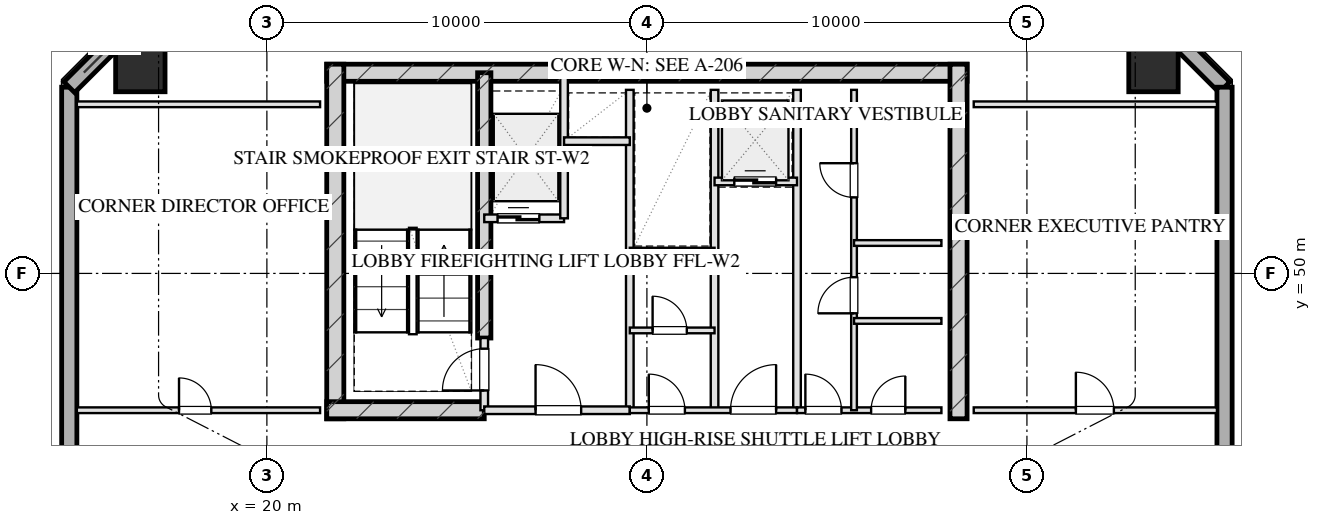
"""IFC4 building model, lengths in metres.
Left out: names, types, materials, properties, quantities, classifications, styles, units other than length and angle.
Written with IfcOpenShell. Run it as: python <this file> out.ifc"""

import sys

from ifc_helpers import new_model, si_unit, direction, frame, frame_2d, origin, origin_2d, place, context, subcontext, project, spatial, rectangle, hollow_rectangle, extrude, element, fill, save


model = new_model("IFC4")
c1 = context("Model", 3, precision=1e-05, world=origin(), true_north=direction((0.0, 1.0)))
c2 = subcontext(c1, "Body", "Model", "MODEL_VIEW")
j1 = project(units=[si_unit("LENGTHUNIT", "METRE"), si_unit("PLANEANGLEUNIT", "RADIAN")], contexts=[c1])
p1 = place(None, origin())
s1 = spatial("IfcSite", under=j1, at=p1, CompositionType="ELEMENT")
p2 = place(p1, origin())
s2 = spatial("IfcBuilding", under=s1, at=p2, CompositionType="ELEMENT")
p3 = place(p2, frame((0.0, 0.0, 223.1)))
s3 = spatial("IfcBuildingStorey", under=s2, at=p3, CompositionType="ELEMENT", Elevation=223.1)
p4 = place(p3, frame((21.575, 55.28, 0.0), z_axis=(0.0, 0.0, 1.0), x_axis=(1.0, 0.0, 0.0)))
e1 = element("IfcWall", 1, at=p4, inside=s3, PredefinedType="SHEAR", context=c2, shape_type="SweptSolid", body=[
    extrude(rectangle(XDim=16.85, YDim=0.45, at=frame_2d((8.425, 0.0))), origin(), (0.0, 0.0, 1.0), 3.45),
])
for number, where, z_axis, x_axis in (
    (2, (21.8, 46.175, 0.0), (0.0, 0.0, 1.0), (0.0, 1.0, 0.0)),
    (3, (38.2, 46.175, 0.0), (0.0, 0.0, 1.0), (0.0, 1.0, 0.0)),
):
    element("IfcWall", number, at=place(p3, frame(where, z_axis=z_axis, x_axis=x_axis)), inside=s3, PredefinedType="SHEAR", context=c2, shape_type="SweptSolid", body=[
        extrude(rectangle(XDim=9.33, YDim=0.45, at=frame_2d((4.665, 0.0))), origin(), (0.0, 0.0, 1.0), 3.45),
    ])
p5 = place(p3, frame((25.72, 48.3, 0.0), z_axis=(0.0, 0.0, 1.0), x_axis=(0.0, 1.0, 0.0)))
e4 = element("IfcWall", 4, at=p5, inside=s3, PredefinedType="SHEAR", context=c2, shape_type="SweptSolid", body=[
    extrude(rectangle(XDim=6.98, YDim=0.35, at=frame_2d((3.49, 0.0))), origin(), (0.0, 0.0, 1.0), 3.45),
])
p6 = place(p3, frame((21.575, 46.4, 0.0), z_axis=(0.0, 0.0, 1.0), x_axis=(1.0, 0.0, 0.0)))
e5 = element("IfcWall", 5, at=p6, inside=s3, PredefinedType="SHEAR", context=c2, shape_type="SweptSolid", body=[
    extrude(rectangle(XDim=4.145, YDim=0.45, at=frame_2d((2.073, 0.0))), origin(), (0.0, 0.0, 1.0), 3.45),
])
for number, where, z_axis, x_axis in (
    (6, (43.33, 55.43, 0.0), (0.0, 0.0, 1.0), (1.0, 0.0, 0.0)),
    (7, (16.67, 55.43, 0.0), (0.0, 0.0, 1.0), (1.0, 0.0, 0.0)),
):
    element("IfcColumn", number, at=place(p3, frame(where, z_axis=z_axis, x_axis=x_axis)), inside=s3, PredefinedType="COLUMN", context=c2, shape_type="SweptSolid", body=[
        extrude(hollow_rectangle(XDim=1.3, YDim=1.3, WallThickness=0.045, at=origin_2d()), origin(), (0.0, 0.0, 1.0), 3.451),
    ])
p7 = place(p3, frame((14.8, 13.1, 0.0), z_axis=(0.0, 0.0, 1.0), x_axis=(0.0, 1.0, 0.0)))
e8 = element("IfcWall", 8, at=p7, inside=s3, PredefinedType="SOLIDWALL", context=c2, shape_type="SweptSolid", body=[
    extrude(rectangle(XDim=41.8, YDim=0.4, at=frame_2d((20.9, 0.0))), origin(), (0.0, 0.0, 1.0), 2.61),
])
p8 = place(p7, frame((13.45, 0.0, 0.75)))
e9 = element("IfcOpeningElement", 9, at=p8, cuts=e8, PredefinedType="OPENING", context=c2, shape_type="SweptSolid", body=[
    extrude(rectangle(XDim=2.1, YDim=1.46, at=frame_2d((1.05, 0.73))), frame((0.0, 0.21, 0.0), z_axis=(0.0, -1.0, 0.0), x_axis=(1.0, 0.0, 0.0)), (0.0, 0.0, 1.0), 0.42),
])
p9 = place(p7, frame((17.25, 0.0, 0.75)))
e10 = element("IfcOpeningElement", 10, at=p9, cuts=e8, PredefinedType="OPENING", context=c2, shape_type="SweptSolid", body=[
    extrude(rectangle(XDim=2.1, YDim=1.46, at=frame_2d((1.05, 0.73))), frame((0.0, 0.21, 0.0), z_axis=(0.0, -1.0, 0.0), x_axis=(1.0, 0.0, 0.0)), (0.0, 0.0, 1.0), 0.42),
])
p10 = place(p7, frame((22.45, 0.0, 0.75)))
e11 = element("IfcOpeningElement", 11, at=p10, cuts=e8, PredefinedType="OPENING", context=c2, shape_type="SweptSolid", body=[
    extrude(rectangle(XDim=2.1, YDim=1.46, at=frame_2d((1.05, 0.73))), frame((0.0, 0.21, 0.0), z_axis=(0.0, -1.0, 0.0), x_axis=(1.0, 0.0, 0.0)), (0.0, 0.0, 1.0), 0.42),
])
p11 = place(p7, frame((26.25, 0.0, 0.75)))
e12 = element("IfcOpeningElement", 12, at=p11, cuts=e8, PredefinedType="OPENING", context=c2, shape_type="SweptSolid", body=[
    extrude(rectangle(XDim=2.1, YDim=1.46, at=frame_2d((1.05, 0.73))), frame((0.0, 0.21, 0.0), z_axis=(0.0, -1.0, 0.0), x_axis=(1.0, 0.0, 0.0)), (0.0, 0.0, 1.0), 0.42),
])
for number, where, z_axis, x_axis in (
    (13, (14.8, 54.9, 0.0), (0.0, 0.0, 1.0), (0.707, 0.707, 0.0)),
    (14, (42.8, 57.3, 0.0), (0.0, 0.0, 1.0), (0.707, -0.707, 0.0)),
):
    element("IfcWall", number, at=place(p3, frame(where, z_axis=z_axis, x_axis=x_axis)), inside=s3, PredefinedType="SOLIDWALL", context=c2, shape_type="SweptSolid", body=[
        extrude(rectangle(XDim=3.394, YDim=0.4, at=frame_2d((1.697, 0.0))), origin(), (0.0, 0.0, 1.0), 2.61),
    ])
p12 = place(p3, frame((45.2, 54.9, 0.0), z_axis=(0.0, 0.0, 1.0), x_axis=(0.0, -1.0, 0.0)))
e15 = element("IfcWall", 15, at=p12, inside=s3, PredefinedType="SOLIDWALL", context=c2, shape_type="SweptSolid", body=[
    extrude(rectangle(XDim=41.8, YDim=0.4, at=frame_2d((20.9, 0.0))), origin(), (0.0, 0.0, 1.0), 2.61),
])
p13 = place(p12, frame((26.25, 0.0, 0.75)))
e16 = element("IfcOpeningElement", 16, at=p13, cuts=e15, PredefinedType="OPENING", context=c2, shape_type="SweptSolid", body=[
    extrude(rectangle(XDim=2.1, YDim=1.46, at=frame_2d((1.05, 0.73))), frame((0.0, 0.21, 0.0), z_axis=(0.0, -1.0, 0.0), x_axis=(1.0, 0.0, 0.0)), (0.0, 0.0, 1.0), 0.42),
])
p14 = place(p12, frame((22.45, 0.0, 0.75)))
e17 = element("IfcOpeningElement", 17, at=p14, cuts=e15, PredefinedType="OPENING", context=c2, shape_type="SweptSolid", body=[
    extrude(rectangle(XDim=2.1, YDim=1.46, at=frame_2d((1.05, 0.73))), frame((0.0, 0.21, 0.0), z_axis=(0.0, -1.0, 0.0), x_axis=(1.0, 0.0, 0.0)), (0.0, 0.0, 1.0), 0.42),
])
p15 = place(p12, frame((17.25, 0.0, 0.75)))
e18 = element("IfcOpeningElement", 18, at=p15, cuts=e15, PredefinedType="OPENING", context=c2, shape_type="SweptSolid", body=[
    extrude(rectangle(XDim=2.1, YDim=1.46, at=frame_2d((1.05, 0.73))), frame((0.0, 0.21, 0.0), z_axis=(0.0, -1.0, 0.0), x_axis=(1.0, 0.0, 0.0)), (0.0, 0.0, 1.0), 0.42),
])
p16 = place(p12, frame((13.45, 0.0, 0.75)))
e19 = element("IfcOpeningElement", 19, at=p16, cuts=e15, PredefinedType="OPENING", context=c2, shape_type="SweptSolid", body=[
    extrude(rectangle(XDim=2.1, YDim=1.46, at=frame_2d((1.05, 0.73))), frame((0.0, 0.21, 0.0), z_axis=(0.0, -1.0, 0.0), x_axis=(1.0, 0.0, 0.0)), (0.0, 0.0, 1.0), 0.42),
])
p17 = place(p3, frame((25.72, 46.4, 0.0), z_axis=(0.0, 0.0, 1.0), x_axis=(0.0, 1.0, 0.0)))
e20 = element("IfcWall", 20, at=p17, inside=s3, PredefinedType="PARTITIONING", context=c2, shape_type="SweptSolid", body=[
    extrude(rectangle(XDim=1.9, YDim=0.2, at=frame_2d((0.95, 0.0))), origin(), (0.0, 0.0, 1.0), 3.175),
])
p18 = place(p17, frame((0.52, 0.0, 0.0)))
e21 = element("IfcOpeningElement", 21, at=p18, cuts=e20, PredefinedType="OPENING", context=c2, shape_type="SweptSolid", body=[
    extrude(rectangle(XDim=1.1, YDim=2.05, at=frame_2d((0.55, 1.025))), frame((0.0, 0.11, 0.0), z_axis=(0.0, -1.0, 0.0), x_axis=(1.0, 0.0, 0.0)), (0.0, 0.0, 1.0), 0.22),
])
p19 = place(p3, frame((29.55, 46.4, 0.0), z_axis=(0.0, 0.0, 1.0), x_axis=(0.0, 1.0, 0.0)))
e22 = element("IfcWall", 22, at=p19, inside=s3, PredefinedType="PARTITIONING", context=c2, shape_type="SweptSolid", body=[
    extrude(rectangle(XDim=8.43, YDim=0.2, at=frame_2d((4.215, 0.0))), origin(), (0.0, 0.0, 1.0), 3.175),
])
p20 = place(p3, frame((25.72, 46.4, 0.0), z_axis=(0.0, 0.0, 1.0), x_axis=(1.0, 0.0, 0.0)))
e23 = element("IfcWall", 23, at=p20, inside=s3, PredefinedType="PARTITIONING", context=c2, shape_type="SweptSolid", body=[
    extrude(rectangle(XDim=3.83, YDim=0.2, at=frame_2d((1.915, 0.0))), origin(), (0.0, 0.0, 1.0), 3.175),
])
p21 = place(p20, frame((1.35, 0.0, 0.0)))
e24 = element("IfcOpeningElement", 24, at=p21, cuts=e23, PredefinedType="OPENING", context=c2, shape_type="SweptSolid", body=[
    extrude(rectangle(XDim=1.2, YDim=2.05, at=frame_2d((0.6, 1.025))), frame((0.0, 0.11, 0.0), z_axis=(0.0, -1.0, 0.0), x_axis=(1.0, 0.0, 0.0)), (0.0, 0.0, 1.0), 0.22),
])
p22 = place(p3, frame((25.72, 51.45, 0.0), z_axis=(0.0, 0.0, 1.0), x_axis=(1.0, 0.0, 0.0)))
e25 = element("IfcWall", 25, at=p22, inside=s3, PredefinedType="PARTITIONING", context=c2, shape_type="SweptSolid", body=[
    extrude(rectangle(XDim=2.1, YDim=0.2, at=frame_2d((1.05, 0.0))), origin(), (0.0, 0.0, 1.0), 3.175),
])
p23 = place(p22, frame((0.35, 0.0, 0.0)))
e26 = element("IfcOpeningElement", 26, at=p23, cuts=e25, PredefinedType="OPENING", context=c2, shape_type="SweptSolid", body=[
    extrude(rectangle(XDim=1.1, YDim=2.05, at=frame_2d((0.55, 1.025))), frame((0.0, 0.11, 0.0), z_axis=(0.0, -1.0, 0.0), x_axis=(1.0, 0.0, 0.0)), (0.0, 0.0, 1.0), 0.22),
])
p24 = place(p3, frame((27.82, 51.45, 0.0), z_axis=(0.0, 0.0, 1.0), x_axis=(0.0, 1.0, 0.0)))
e27 = element("IfcWall", 27, at=p24, inside=s3, PredefinedType="PARTITIONING", context=c2, shape_type="SweptSolid", body=[
    extrude(rectangle(XDim=3.7, YDim=0.2, at=frame_2d((1.85, 0.0))), origin(), (0.0, 0.0, 1.0), 3.175),
])
p25 = place(p3, frame((27.82, 53.48, 0.0), z_axis=(0.0, 0.0, 1.0), x_axis=(1.0, 0.0, 0.0)))
e28 = element("IfcWall", 28, at=p25, inside=s3, PredefinedType="PARTITIONING", context=c2, shape_type="SweptSolid", body=[
    extrude(rectangle(XDim=1.73, YDim=0.2, at=frame_2d((0.865, 0.0))), origin(), (0.0, 0.0, 1.0), 3.175),
])
for number, where, z_axis, x_axis in (
    (29, (33.95, 46.4, 0.0), (0.0, 0.0, 1.0), (0.0, 1.0, 0.0)),
    (30, (31.78, 46.4, 0.0), (0.0, 0.0, 1.0), (0.0, 1.0, 0.0)),
):
    element("IfcWall", number, at=place(p3, frame(where, z_axis=z_axis, x_axis=x_axis)), inside=s3, PredefinedType="PARTITIONING", context=c2, shape_type="SweptSolid", body=[
        extrude(rectangle(XDim=8.43, YDim=0.2, at=frame_2d((4.215, 0.0))), origin(), (0.0, 0.0, 1.0), 3.175),
    ])
p26 = place(p3, frame((29.55, 46.4, 0.0), z_axis=(0.0, 0.0, 1.0), x_axis=(1.0, 0.0, 0.0)))
e31 = element("IfcWall", 31, at=p26, inside=s3, PredefinedType="PARTITIONING", context=c2, shape_type="SweptSolid", body=[
    extrude(rectangle(XDim=4.4, YDim=0.15, at=frame_2d((2.2, 0.0))), origin(), (0.0, 0.0, 1.0), 3.175),
])
p27 = place(p26, frame((0.5, 0.0, 0.0)))
e32 = element("IfcOpeningElement", 32, at=p27, cuts=e31, PredefinedType="OPENING", context=c2, shape_type="SweptSolid", body=[
    extrude(rectangle(XDim=0.95, YDim=2.05, at=frame_2d((0.475, 1.025))), frame((0.0, 0.085, 0.0), z_axis=(0.0, -1.0, 0.0), x_axis=(1.0, 0.0, 0.0)), (0.0, 0.0, 1.0), 0.17),
])
p28 = place(p26, frame((2.65, 0.0, 0.0)))
e33 = element("IfcOpeningElement", 33, at=p28, cuts=e31, PredefinedType="OPENING", context=c2, shape_type="SweptSolid", body=[
    extrude(rectangle(XDim=1.2, YDim=2.05, at=frame_2d((0.6, 1.025))), frame((0.0, 0.085, 0.0), z_axis=(0.0, -1.0, 0.0), x_axis=(1.0, 0.0, 0.0)), (0.0, 0.0, 1.0), 0.17),
])
p29 = place(p3, frame((29.55, 50.6, 0.0), z_axis=(0.0, 0.0, 1.0), x_axis=(1.0, 0.0, 0.0)))
e34 = element("IfcWall", 34, at=p29, inside=s3, PredefinedType="PARTITIONING", context=c2, shape_type="SweptSolid", body=[
    extrude(rectangle(XDim=2.23, YDim=0.15, at=frame_2d((1.115, 0.0))), origin(), (0.0, 0.0, 1.0), 3.175),
])
p30 = place(p3, frame((29.55, 48.5, 0.0), z_axis=(0.0, 0.0, 1.0), x_axis=(1.0, 0.0, 0.0)))
e35 = element("IfcWall", 35, at=p30, inside=s3, PredefinedType="PARTITIONING", context=c2, shape_type="SweptSolid", body=[
    extrude(rectangle(XDim=2.23, YDim=0.15, at=frame_2d((1.115, 0.0))), origin(), (0.0, 0.0, 1.0), 3.175),
])
p31 = place(p30, frame((0.6, 0.0, 0.0)))
e36 = element("IfcOpeningElement", 36, at=p31, cuts=e35, PredefinedType="OPENING", context=c2, shape_type="SweptSolid", body=[
    extrude(rectangle(XDim=0.9, YDim=2.05, at=frame_2d((0.45, 1.025))), frame((0.0, 0.085, 0.0), z_axis=(0.0, -1.0, 0.0), x_axis=(1.0, 0.0, 0.0)), (0.0, 0.0, 1.0), 0.17),
])
p32 = place(p3, frame((31.78, 52.42, 0.0), z_axis=(0.0, 0.0, 1.0), x_axis=(1.0, 0.0, 0.0)))
e37 = element("IfcWall", 37, at=p32, inside=s3, PredefinedType="PARTITIONING", context=c2, shape_type="SweptSolid", body=[
    extrude(rectangle(XDim=2.17, YDim=0.2, at=frame_2d((1.085, 0.0))), origin(), (0.0, 0.0, 1.0), 3.175),
])
p33 = place(p32, frame((0.52, 0.0, 0.0)))
e38 = element("IfcOpeningElement", 38, at=p33, cuts=e37, PredefinedType="OPENING", context=c2, shape_type="SweptSolid", body=[
    extrude(rectangle(XDim=1.1, YDim=2.05, at=frame_2d((0.55, 1.025))), frame((0.0, 0.11, 0.0), z_axis=(0.0, -1.0, 0.0), x_axis=(1.0, 0.0, 0.0)), (0.0, 0.0, 1.0), 0.22),
])
p34 = place(p3, frame((33.95, 46.4, 0.0), z_axis=(0.0, 0.0, 1.0), x_axis=(1.0, 0.0, 0.0)))
e39 = element("IfcWall", 39, at=p34, inside=s3, PredefinedType="PARTITIONING", context=c2, shape_type="SweptSolid", body=[
    extrude(rectangle(XDim=3.8, YDim=0.15, at=frame_2d((1.9, 0.0))), origin(), (0.0, 0.0, 1.0), 3.175),
])
p35 = place(p34, frame((0.22, 0.0, 0.0)))
e40 = element("IfcOpeningElement", 40, at=p35, cuts=e39, PredefinedType="OPENING", context=c2, shape_type="SweptSolid", body=[
    extrude(rectangle(XDim=0.95, YDim=2.05, at=frame_2d((0.475, 1.025))), frame((0.0, 0.085, 0.0), z_axis=(0.0, -1.0, 0.0), x_axis=(1.0, 0.0, 0.0)), (0.0, 0.0, 1.0), 0.17),
])
p36 = place(p34, frame((1.95, 0.0, 0.0)))
e41 = element("IfcOpeningElement", 41, at=p36, cuts=e39, PredefinedType="OPENING", context=c2, shape_type="SweptSolid", body=[
    extrude(rectangle(XDim=0.9, YDim=2.05, at=frame_2d((0.45, 1.025))), frame((0.0, 0.085, 0.0), z_axis=(0.0, -1.0, 0.0), x_axis=(1.0, 0.0, 0.0)), (0.0, 0.0, 1.0), 0.17),
])
p37 = place(p3, frame((35.45, 46.4, 0.0), z_axis=(0.0, 0.0, 1.0), x_axis=(0.0, 1.0, 0.0)))
e42 = element("IfcWall", 42, at=p37, inside=s3, PredefinedType="PARTITIONING", context=c2, shape_type="SweptSolid", body=[
    extrude(rectangle(XDim=8.43, YDim=0.15, at=frame_2d((4.215, 0.0))), origin(), (0.0, 0.0, 1.0), 2.765),
])
p38 = place(p37, frame((2.55, 0.0, 0.0)))
e43 = element("IfcOpeningElement", 43, at=p38, cuts=e42, PredefinedType="OPENING", context=c2, shape_type="SweptSolid", body=[
    extrude(rectangle(XDim=0.95, YDim=2.05, at=frame_2d((0.475, 1.025))), frame((0.0, 0.085, 0.0), z_axis=(0.0, -1.0, 0.0), x_axis=(1.0, 0.0, 0.0)), (0.0, 0.0, 1.0), 0.17),
])
p39 = place(p37, frame((5.6, 0.0, 0.0)))
e44 = element("IfcOpeningElement", 44, at=p39, cuts=e42, PredefinedType="OPENING", context=c2, shape_type="SweptSolid", body=[
    extrude(rectangle(XDim=0.9, YDim=2.05, at=frame_2d((0.45, 1.025))), frame((0.0, 0.085, 0.0), z_axis=(0.0, -1.0, 0.0), x_axis=(1.0, 0.0, 0.0)), (0.0, 0.0, 1.0), 0.17),
])
for number, where, z_axis, x_axis in (
    (45, (35.45, 50.8, 0.0), (0.0, 0.0, 1.0), (1.0, 0.0, 0.0)),
    (46, (35.45, 48.75, 0.0), (0.0, 0.0, 1.0), (1.0, 0.0, 0.0)),
):
    element("IfcWall", number, at=place(p3, frame(where, z_axis=z_axis, x_axis=x_axis)), inside=s3, PredefinedType="PARTITIONING", context=c2, shape_type="SweptSolid", body=[
        extrude(rectangle(XDim=2.3, YDim=0.15, at=frame_2d((1.15, 0.0))), origin(), (0.0, 0.0, 1.0), 3.175),
    ])
p40 = place(p3, frame((15.0, 54.45, 0.0), z_axis=(0.0, 0.0, 1.0), x_axis=(1.0, 0.0, 0.0)))
e47 = element("IfcWall", 47, at=p40, inside=s3, PredefinedType="PARTITIONING", context=c2, shape_type="SweptSolid", body=[
    extrude(rectangle(XDim=6.4, YDim=0.15, at=frame_2d((3.2, 0.0))), origin(), (0.0, 0.0, 1.0), 3.175),
])
p41 = place(p3, frame((15.0, 46.4, 0.0), z_axis=(0.0, 0.0, 1.0), x_axis=(1.0, 0.0, 0.0)))
e48 = element("IfcWall", 48, at=p41, inside=s3, PredefinedType="PARTITIONING", context=c2, shape_type="SweptSolid", body=[
    extrude(rectangle(XDim=6.4, YDim=0.15, at=frame_2d((3.2, 0.0))), origin(), (0.0, 0.0, 1.0), 3.175),
])
p42 = place(p41, frame((2.688, 0.0, 0.0)))
e49 = element("IfcOpeningElement", 49, at=p42, cuts=e48, PredefinedType="OPENING", context=c2, shape_type="SweptSolid", body=[
    extrude(rectangle(XDim=0.85, YDim=2.05, at=frame_2d((0.425, 1.025))), frame((0.0, 0.085, 0.0), z_axis=(0.0, -1.0, 0.0), x_axis=(1.0, 0.0, 0.0)), (0.0, 0.0, 1.0), 0.17),
])
p43 = place(p3, frame((38.6, 54.45, 0.0), z_axis=(0.0, 0.0, 1.0), x_axis=(1.0, 0.0, 0.0)))
e50 = element("IfcWall", 50, at=p43, inside=s3, PredefinedType="PARTITIONING", context=c2, shape_type="SweptSolid", body=[
    extrude(rectangle(XDim=6.4, YDim=0.15, at=frame_2d((3.2, 0.0))), origin(), (0.0, 0.0, 1.0), 3.175),
])
p44 = place(p3, frame((38.6, 46.4, 0.0), z_axis=(0.0, 0.0, 1.0), x_axis=(1.0, 0.0, 0.0)))
e51 = element("IfcWall", 51, at=p44, inside=s3, PredefinedType="PARTITIONING", context=c2, shape_type="SweptSolid", body=[
    extrude(rectangle(XDim=6.4, YDim=0.15, at=frame_2d((3.2, 0.0))), origin(), (0.0, 0.0, 1.0), 3.175),
])
p45 = place(p44, frame((2.688, 0.0, 0.0)))
e52 = element("IfcOpeningElement", 52, at=p45, cuts=e51, PredefinedType="OPENING", context=c2, shape_type="SweptSolid", body=[
    extrude(rectangle(XDim=1.0, YDim=2.05, at=frame_2d((0.5, 1.025))), frame((0.0, 0.085, 0.0), z_axis=(0.0, -1.0, 0.0), x_axis=(1.0, 0.0, 0.0)), (0.0, 0.0, 1.0), 0.17),
])
p46 = place(p18, origin())
e53 = element("IfcDoor", 53, at=p46, inside=s3, OperationType="SINGLE_SWING_LEFT", PredefinedType="DOOR", context=c2, shape_type="SweptSolid", body=[
    extrude(rectangle(XDim=1.1, YDim=2.05, at=frame_2d((0.55, 1.025))), frame((0.0, 0.025, 0.0), z_axis=(0.0, -1.0, 0.0), x_axis=(1.0, 0.0, 0.0)), (0.0, 0.0, 1.0), 0.05),
])
fill(e21, e53)
p47 = place(p21, origin())
e54 = element("IfcDoor", 54, at=p47, inside=s3, OperationType="SINGLE_SWING_LEFT", PredefinedType="DOOR", context=c2, shape_type="SweptSolid", body=[
    extrude(rectangle(XDim=1.2, YDim=2.05, at=frame_2d((0.6, 1.025))), frame((0.0, 0.025, 0.0), z_axis=(0.0, -1.0, 0.0), x_axis=(1.0, 0.0, 0.0)), (0.0, 0.0, 1.0), 0.05),
])
fill(e24, e54)
p48 = place(p23, origin())
e55 = element("IfcDoor", 55, at=p48, inside=s3, OperationType="DOUBLE_DOOR_SLIDING", PredefinedType="DOOR", context=c2, shape_type="SweptSolid", body=[
    extrude(rectangle(XDim=1.1, YDim=2.05, at=frame_2d((0.55, 1.025))), frame((0.0, 0.025, 0.0), z_axis=(0.0, -1.0, 0.0), x_axis=(1.0, 0.0, 0.0)), (0.0, 0.0, 1.0), 0.05),
])
fill(e26, e55)
p49 = place(p27, origin())
e56 = element("IfcDoor", 56, at=p49, inside=s3, OperationType="SINGLE_SWING_LEFT", PredefinedType="DOOR", context=c2, shape_type="SweptSolid", body=[
    extrude(rectangle(XDim=0.95, YDim=2.05, at=frame_2d((0.475, 1.025))), frame((0.0, 0.025, 0.0), z_axis=(0.0, -1.0, 0.0), x_axis=(1.0, 0.0, 0.0)), (0.0, 0.0, 1.0), 0.05),
])
fill(e32, e56)
p50 = place(p28, origin())
e57 = element("IfcDoor", 57, at=p50, inside=s3, OperationType="SINGLE_SWING_RIGHT", PredefinedType="DOOR", context=c2, shape_type="SweptSolid", body=[
    extrude(rectangle(XDim=1.2, YDim=2.05, at=frame_2d((0.6, 1.025))), frame((0.0, 0.025, 0.0), z_axis=(0.0, -1.0, 0.0), x_axis=(1.0, 0.0, 0.0)), (0.0, 0.0, 1.0), 0.05),
])
fill(e33, e57)
p51 = place(p31, origin())
e58 = element("IfcDoor", 58, at=p51, inside=s3, OperationType="SINGLE_SWING_LEFT", PredefinedType="DOOR", context=c2, shape_type="SweptSolid", body=[
    extrude(rectangle(XDim=0.9, YDim=2.05, at=frame_2d((0.45, 1.025))), frame((0.0, 0.025, 0.0), z_axis=(0.0, -1.0, 0.0), x_axis=(1.0, 0.0, 0.0)), (0.0, 0.0, 1.0), 0.05),
])
fill(e36, e58)
p52 = place(p33, origin())
e59 = element("IfcDoor", 59, at=p52, inside=s3, OperationType="DOUBLE_DOOR_SLIDING", PredefinedType="DOOR", context=c2, shape_type="SweptSolid", body=[
    extrude(rectangle(XDim=1.1, YDim=2.05, at=frame_2d((0.55, 1.025))), frame((0.0, 0.025, 0.0), z_axis=(0.0, -1.0, 0.0), x_axis=(1.0, 0.0, 0.0)), (0.0, 0.0, 1.0), 0.05),
])
fill(e38, e59)
p53 = place(p35, origin())
e60 = element("IfcDoor", 60, at=p53, inside=s3, OperationType="SINGLE_SWING_LEFT", PredefinedType="DOOR", context=c2, shape_type="SweptSolid", body=[
    extrude(rectangle(XDim=0.95, YDim=2.05, at=frame_2d((0.475, 1.025))), frame((0.0, 0.025, 0.0), z_axis=(0.0, -1.0, 0.0), x_axis=(1.0, 0.0, 0.0)), (0.0, 0.0, 1.0), 0.05),
])
fill(e40, e60)
p54 = place(p36, origin())
e61 = element("IfcDoor", 61, at=p54, inside=s3, OperationType="SINGLE_SWING_RIGHT", PredefinedType="DOOR", context=c2, shape_type="SweptSolid", body=[
    extrude(rectangle(XDim=0.9, YDim=2.05, at=frame_2d((0.45, 1.025))), frame((0.0, 0.025, 0.0), z_axis=(0.0, -1.0, 0.0), x_axis=(1.0, 0.0, 0.0)), (0.0, 0.0, 1.0), 0.05),
])
fill(e41, e61)
p55 = place(p38, origin())
e62 = element("IfcDoor", 62, at=p55, inside=s3, OperationType="SINGLE_SWING_LEFT", PredefinedType="DOOR", context=c2, shape_type="SweptSolid", body=[
    extrude(rectangle(XDim=0.95, YDim=2.05, at=frame_2d((0.475, 1.025))), frame((0.0, 0.025, 0.0), z_axis=(0.0, -1.0, 0.0), x_axis=(1.0, 0.0, 0.0)), (0.0, 0.0, 1.0), 0.05),
])
fill(e43, e62)
p56 = place(p39, origin())
e63 = element("IfcDoor", 63, at=p56, inside=s3, OperationType="SINGLE_SWING_RIGHT", PredefinedType="DOOR", context=c2, shape_type="SweptSolid", body=[
    extrude(rectangle(XDim=0.9, YDim=2.05, at=frame_2d((0.45, 1.025))), frame((0.0, 0.025, 0.0), z_axis=(0.0, -1.0, 0.0), x_axis=(1.0, 0.0, 0.0)), (0.0, 0.0, 1.0), 0.05),
])
fill(e44, e63)
p57 = place(p42, origin())
e64 = element("IfcDoor", 64, at=p57, inside=s3, OperationType="SINGLE_SWING_LEFT", PredefinedType="DOOR", context=c2, shape_type="SweptSolid", body=[
    extrude(rectangle(XDim=0.85, YDim=2.05, at=frame_2d((0.425, 1.025))), frame((0.0, 0.025, 0.0), z_axis=(0.0, -1.0, 0.0), x_axis=(1.0, 0.0, 0.0)), (0.0, 0.0, 1.0), 0.05),
])
fill(e49, e64)
p58 = place(p45, origin())
e65 = element("IfcDoor", 65, at=p58, inside=s3, OperationType="SINGLE_SWING_LEFT", PredefinedType="DOOR", context=c2, shape_type="SweptSolid", body=[
    extrude(rectangle(XDim=1.0, YDim=2.05, at=frame_2d((0.5, 1.025))), frame((0.0, 0.025, 0.0), z_axis=(0.0, -1.0, 0.0), x_axis=(1.0, 0.0, 0.0)), (0.0, 0.0, 1.0), 0.05),
])
fill(e52, e65)
save(model, sys.argv[1])
